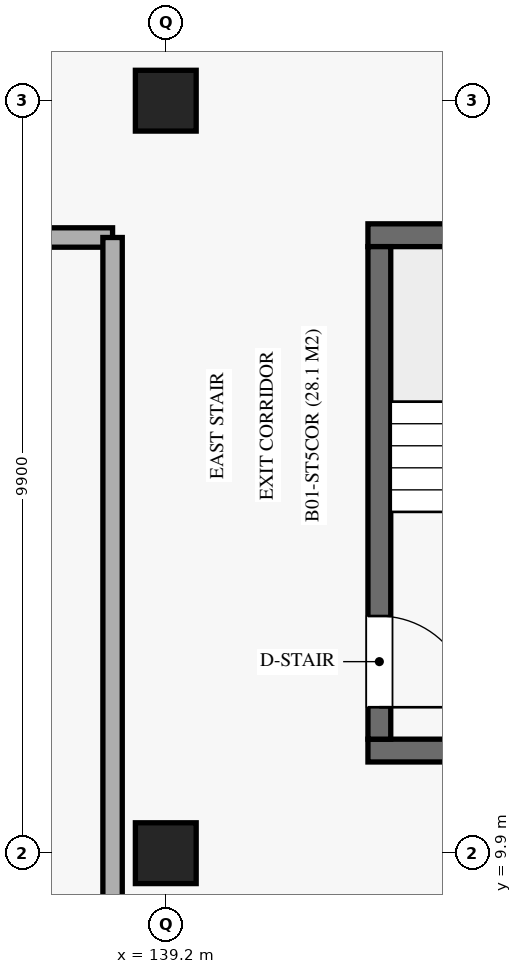
"""IFC4 building model, lengths in metres.
Left out: names, types, materials, properties, quantities, classifications, styles, units other than length and angle.
Written with IfcOpenShell. Run it as: python <this file> out.ifc"""

import sys

from ifc_helpers import new_model, si_unit, direction, frame, frame_2d, origin, origin_2d, place, context, subcontext, project, spatial, rectangle, extrude, element, fill, save


model = new_model("IFC4")
c1 = context("Model", 3, precision=1e-05, world=origin(), true_north=direction((0.0, 1.0)))
c2 = subcontext(c1, "Body", "Model", "MODEL_VIEW")
j1 = project(units=[si_unit("LENGTHUNIT", "METRE"), si_unit("PLANEANGLEUNIT", "RADIAN")], contexts=[c1])
p1 = place(None, origin())
s1 = spatial("IfcSite", under=j1, at=p1, CompositionType="ELEMENT")
p2 = place(p1, origin())
s2 = spatial("IfcBuilding", under=s1, at=p2, CompositionType="ELEMENT")
p3 = place(p2, frame((0.0, 0.0, -4.59)))
s3 = spatial("IfcBuildingStorey", under=s2, at=p3, CompositionType="ELEMENT", Elevation=-4.59)
for number, where, z_axis, x_axis in (
    (1, (139.2, 9.9, 0.0), (0.0, 0.0, 1.0), (1.0, 0.0, 0.0)),
    (2, (139.2, 19.8, 0.0), (0.0, 0.0, 1.0), (1.0, 0.0, 0.0)),
):
    element("IfcColumn", number, at=place(p3, frame(where, z_axis=z_axis, x_axis=x_axis)), inside=s3, PredefinedType="COLUMN", context=c2, shape_type="SweptSolid", body=[
        extrude(rectangle(XDim=0.8, YDim=0.8, at=origin_2d()), origin(), (0.0, 0.0, 1.0), 4.59),
    ])
for number, where, z_axis, x_axis in (
    (3, (141.86, 11.25, 0.0), (0.0, 0.0, 1.0), (1.0, 0.0, 0.0)),
    (4, (141.86, 18.03, 0.0), (0.0, 0.0, 1.0), (1.0, 0.0, 0.0)),
):
    element("IfcWall", number, at=place(p3, frame(where, z_axis=z_axis, x_axis=x_axis)), inside=s3, PredefinedType="SHEAR", context=c2, shape_type="SweptSolid", body=[
        extrude(rectangle(XDim=7.08, YDim=0.3, at=frame_2d((3.54, 0.0))), origin(), (0.0, 0.0, 1.0), 4.29),
    ])
p4 = place(p3, frame((142.01, 11.4, 0.0), z_axis=(0.0, 0.0, 1.0), x_axis=(0.0, 1.0, 0.0)))
e5 = element("IfcWall", 5, at=p4, inside=s3, PredefinedType="SHEAR", context=c2, shape_type="SweptSolid", body=[
    extrude(rectangle(XDim=6.48, YDim=0.3, at=frame_2d((3.24, 0.0))), origin(), (0.0, 0.0, 1.0), 4.29),
])
p5 = place(p4, frame((0.42, 0.0, 0.0)))
e6 = element("IfcOpeningElement", 6, at=p5, cuts=e5, PredefinedType="OPENING", context=c2, shape_type="SweptSolid", body=[
    extrude(rectangle(XDim=1.2, YDim=2.2, at=frame_2d((0.6, 1.1))), frame((0.0, 0.16, 0.0), z_axis=(0.0, -1.0, 0.0), x_axis=(1.0, 0.0, 0.0)), (0.0, 0.0, 1.0), 0.32),
])
p6 = place(p3, frame((114.6, 18.0, 0.0), z_axis=(0.0, 0.0, 1.0), x_axis=(1.0, 0.0, 0.0)))
e7 = element("IfcWall", 7, at=p6, inside=s3, PredefinedType="SOLIDWALL", context=c2, shape_type="SweptSolid", body=[
    extrude(rectangle(XDim=23.9, YDim=0.255, at=frame_2d((11.95, 0.0))), origin(), (0.0, 0.0, 1.0), 3.41),
])
p7 = place(p6, frame((14.0, 0.0, 0.0)))
e8 = element("IfcOpeningElement", 8, at=p7, cuts=e7, PredefinedType="OPENING", context=c2, shape_type="SweptSolid", body=[
    extrude(rectangle(XDim=1.8, YDim=2.35, at=frame_2d((0.9, 1.175))), frame((0.0, 0.137, 0.0), z_axis=(0.0, -1.0, 0.0), x_axis=(1.0, 0.0, 0.0)), (0.0, 0.0, 1.0), 0.275),
])
p8 = place(p3, frame((138.5, 0.6, 0.0), z_axis=(0.0, 0.0, 1.0), x_axis=(0.0, 1.0, 0.0)))
e9 = element("IfcWall", 9, at=p8, inside=s3, PredefinedType="SOLIDWALL", context=c2, shape_type="SweptSolid", body=[
    extrude(rectangle(XDim=17.4, YDim=0.255, at=frame_2d((8.7, 0.0))), origin(), (0.0, 0.0, 1.0), 3.41),
])
p9 = place(p5, frame((1.2, 0.0, 0.0), z_axis=(0.0, 0.0, 1.0), x_axis=(-1.0, 0.0, 0.0)))
e10 = element("IfcDoor", 10, at=p9, inside=s3, OperationType="SINGLE_SWING_RIGHT", PredefinedType="DOOR", context=c2, shape_type="SweptSolid", body=[
    extrude(rectangle(XDim=1.2, YDim=2.2, at=frame_2d((0.6, 1.1))), frame((0.0, 0.025, 0.0), z_axis=(0.0, -1.0, 0.0), x_axis=(1.0, 0.0, 0.0)), (0.0, 0.0, 1.0), 0.05),
])
fill(e6, e10)
save(model, sys.argv[1])
